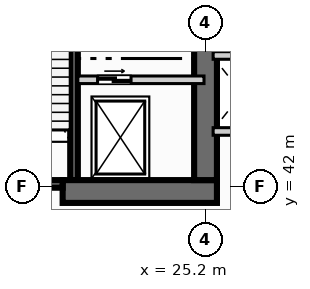
"""IFC4 building model, lengths in metres.
Left out: names, types, materials, properties, quantities, classifications, styles, units other than length and angle.
Written with IfcOpenShell. Run it as: python <this file> out.ifc"""

import sys

from ifc_helpers import new_model, si_unit, direction, frame, frame_2d, origin, place, context, subcontext, project, spatial, rectangle, extrude, element, fill, save


model = new_model("IFC4")
c1 = context("Model", 3, precision=1e-05, world=origin(), true_north=direction((0.0, 1.0)))
c2 = subcontext(c1, "Body", "Model", "MODEL_VIEW")
j1 = project(units=[si_unit("LENGTHUNIT", "METRE"), si_unit("PLANEANGLEUNIT", "RADIAN")], contexts=[c1])
p1 = place(None, origin())
s1 = spatial("IfcSite", under=j1, at=p1, CompositionType="ELEMENT")
p2 = place(p1, origin())
s2 = spatial("IfcBuilding", under=s1, at=p2, CompositionType="ELEMENT")
p3 = place(p2, frame((0.0, 0.0, 145.6)))
s3 = spatial("IfcBuildingStorey", under=s2, at=p3, CompositionType="ELEMENT", Elevation=145.6)
p4 = place(p3, frame((20.875, 42.2, 0.0), z_axis=(0.0, 0.0, 1.0), x_axis=(0.0, 1.0, 0.0)))
e1 = element("IfcWall", 1, at=p4, inside=s3, PredefinedType="SOLIDWALL", context=c2, shape_type="SweptSolid", body=[
    extrude(rectangle(XDim=8.05, YDim=0.25, at=frame_2d((4.025, 0.0))), origin(), (0.0, 0.0, 1.0), 3.55),
])
p5 = place(p3, frame((20.5, 41.825, 0.0), z_axis=(0.0, 0.0, 1.0), x_axis=(1.0, 0.0, 0.0)))
e2 = element("IfcWall", 2, at=p5, inside=s3, PredefinedType="SHEAR", context=c2, shape_type="SweptSolid", body=[
    extrude(rectangle(XDim=5.075, YDim=0.75, at=frame_2d((2.538, 0.0))), origin(), (0.0, 0.0, 1.0), 3.55),
])
p6 = place(p3, frame((25.2, 42.2, 0.0), z_axis=(0.0, 0.0, 1.0), x_axis=(0.0, 1.0, 0.0)))
e3 = element("IfcWall", 3, at=p6, inside=s3, PredefinedType="SHEAR", context=c2, shape_type="SweptSolid", body=[
    extrude(rectangle(XDim=8.6, YDim=0.75, at=frame_2d((4.3, 0.0))), origin(), (0.0, 0.0, 1.0), 3.55),
])
p7 = place(p3, frame((18.0, 42.075, 0.0), z_axis=(0.0, 0.0, 1.0), x_axis=(1.0, 0.0, 0.0)))
e4 = element("IfcWall", 4, at=p7, inside=s3, PredefinedType="SOLIDWALL", context=c2, shape_type="SweptSolid", body=[
    extrude(rectangle(XDim=2.5, YDim=0.25, at=frame_2d((1.25, 0.0))), origin(), (0.0, 0.0, 1.0), 3.55),
])
p8 = place(p7, frame((0.7, 0.0, 0.0)))
e5 = element("IfcOpeningElement", 5, at=p8, cuts=e4, PredefinedType="OPENING", context=c2, shape_type="SweptSolid", body=[
    extrude(rectangle(XDim=1.1, YDim=2.15, at=frame_2d((0.55, 1.075))), frame((0.0, 0.135, 0.0), z_axis=(0.0, -1.0, 0.0), x_axis=(1.0, 0.0, 0.0)), (0.0, 0.0, 1.0), 0.27),
])
p9 = place(p3, frame((21.0, 45.5, 0.0), z_axis=(0.0, 0.0, 1.0), x_axis=(1.0, 0.0, 0.0)))
e6 = element("IfcWall", 6, at=p9, inside=s3, PredefinedType="SOLIDWALL", context=c2, shape_type="SweptSolid", body=[
    extrude(rectangle(XDim=4.15, YDim=0.25, at=frame_2d((2.075, 0.0))), origin(), (0.0, 0.0, 1.0), 3.55),
])
p10 = place(p9, frame((0.65, 0.0, 0.0)))
e7 = element("IfcOpeningElement", 7, at=p10, cuts=e6, PredefinedType="OPENING", context=c2, shape_type="SweptSolid", body=[
    extrude(rectangle(XDim=1.1, YDim=2.15, at=frame_2d((0.55, 1.075))), frame((0.0, 0.135, 0.0), z_axis=(0.0, -1.0, 0.0), x_axis=(1.0, 0.0, 0.0)), (0.0, 0.0, 1.0), 0.27),
])
for number, where, z_axis, x_axis in (
    (8, (25.45, 43.8, 0.0), (0.0, 0.0, 1.0), (1.0, 0.0, 0.0)),
    (9, (25.45, 46.3, 0.0), (0.0, 0.0, 1.0), (1.0, 0.0, 0.0)),
):
    element("IfcWall", number, at=place(p3, frame(where, z_axis=z_axis, x_axis=x_axis)), inside=s3, PredefinedType="SOLIDWALL", context=c2, shape_type="SweptSolid", body=[
        extrude(rectangle(XDim=1.825, YDim=0.25, at=frame_2d((0.913, 0.0))), origin(), (0.0, 0.0, 1.0), 3.55),
    ])
p11 = place(p10, origin())
e10 = element("IfcDoor", 10, at=p11, inside=s3, OperationType="SLIDING_TO_LEFT", PredefinedType="DOOR", context=c2, shape_type="SweptSolid", body=[
    extrude(rectangle(XDim=1.1, YDim=2.15, at=frame_2d((0.55, 1.075))), frame((0.0, 0.025, 0.0), z_axis=(0.0, -1.0, 0.0), x_axis=(1.0, 0.0, 0.0)), (0.0, 0.0, 1.0), 0.05),
])
fill(e7, e10)
save(model, sys.argv[1])
